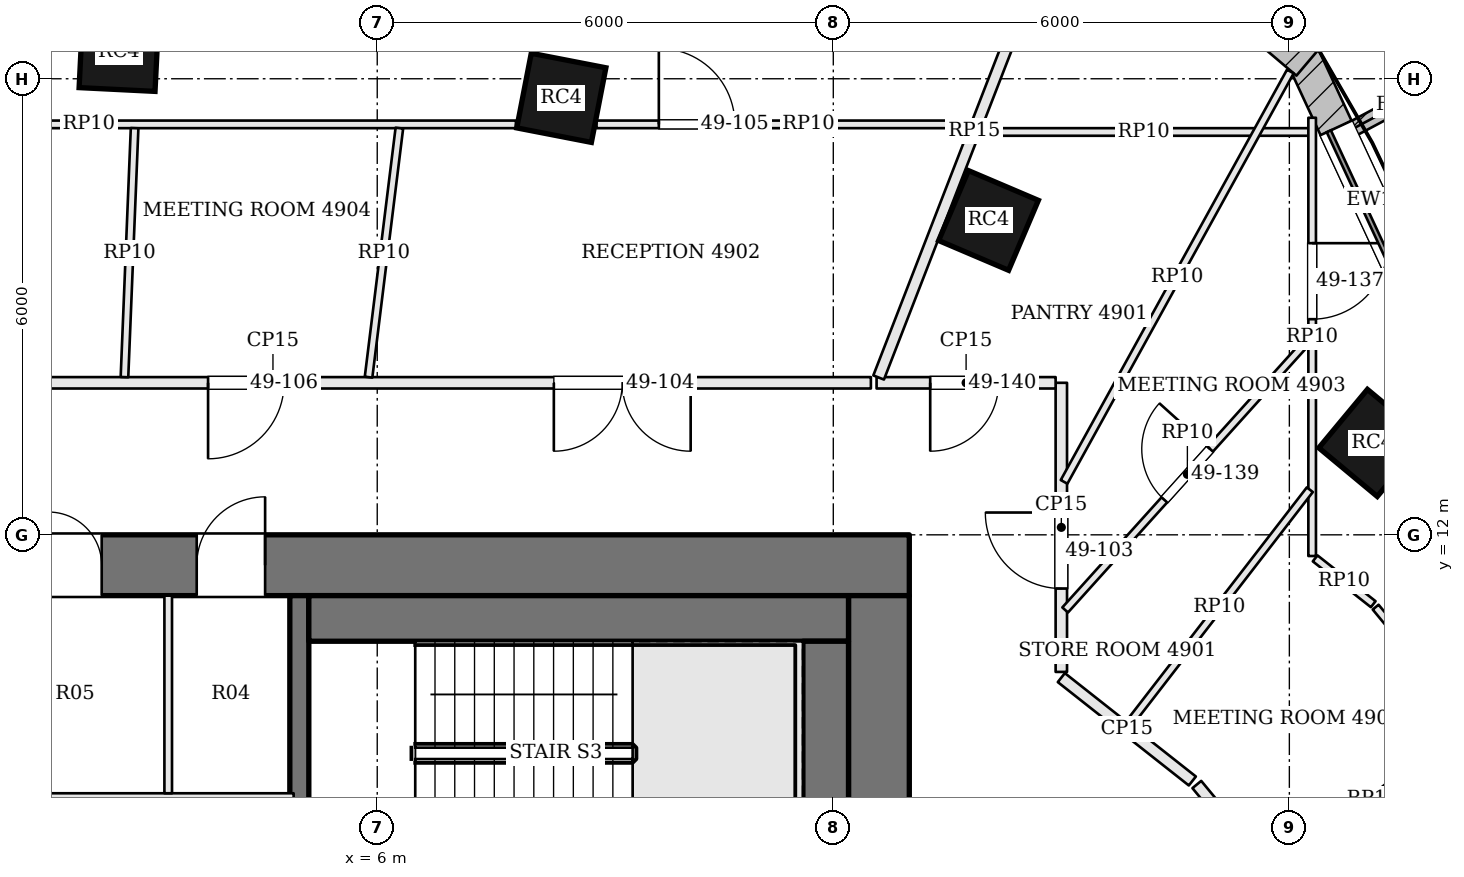
"""IFC4 building model, lengths in metres.
Left out: names, types, materials, properties, quantities, classifications, styles, units other than length and angle.
Written with IfcOpenShell. Run it as: python <this file> out.ifc"""

import sys

from ifc_helpers import new_model, si_unit, direction, frame, frame_2d, origin, origin_2d, place, context, subcontext, project, spatial, rectangle, extrude, element, fill, save


model = new_model("IFC4")
c1 = context("Model", 3, precision=1e-05, world=origin(), true_north=direction((0.0, 1.0)))
c2 = subcontext(c1, "Body", "Model", "MODEL_VIEW")
j1 = project(units=[si_unit("LENGTHUNIT", "METRE"), si_unit("PLANEANGLEUNIT", "RADIAN")], contexts=[c1])
p1 = place(None, origin())
s1 = spatial("IfcSite", under=j1, at=p1, CompositionType="ELEMENT")
p2 = place(p1, origin())
s2 = spatial("IfcBuilding", under=s1, at=p2, CompositionType="ELEMENT")
p3 = place(p2, frame((0.0, 0.0, 201.3)))
s3 = spatial("IfcBuildingStorey", under=s2, at=p3, CompositionType="ELEMENT", Elevation=201.3)
p4 = place(p3, frame((-13.0, 11.6, 0.0), z_axis=(0.0, 0.0, 1.0), x_axis=(1.0, 0.0, 0.0)))
e1 = element("IfcWall", 1, at=p4, inside=s3, PredefinedType="SHEAR", context=c2, shape_type="SweptSolid", body=[
    extrude(rectangle(XDim=26.0, YDim=0.8, at=frame_2d((13.0, 0.0))), origin(), (0.0, 0.0, 1.0), 3.9),
])
p5 = place(p4, frame((9.375, 0.0, 0.0)))
e2 = element("IfcOpeningElement", 2, at=p5, cuts=e1, PredefinedType="OPENING", context=c2, shape_type="SweptSolid", body=[
    extrude(rectangle(XDim=0.7, YDim=2.1, at=frame_2d((0.35, 1.05))), frame((0.0, 0.41, 0.0), z_axis=(0.0, -1.0, 0.0), x_axis=(1.0, 0.0, 0.0)), (0.0, 0.0, 1.0), 0.82),
])
p6 = place(p4, frame((12.075, 0.0, 0.0)))
e3 = element("IfcOpeningElement", 3, at=p6, cuts=e1, PredefinedType="OPENING", context=c2, shape_type="SweptSolid", body=[
    extrude(rectangle(XDim=1.0, YDim=2.1, at=frame_2d((0.5, 1.05))), frame((0.0, 0.41, 0.0), z_axis=(0.0, -1.0, 0.0), x_axis=(1.0, 0.0, 0.0)), (0.0, 0.0, 1.0), 0.82),
])
p7 = place(p4, frame((14.675, 0.0, 0.0)))
e4 = element("IfcOpeningElement", 4, at=p7, cuts=e1, PredefinedType="OPENING", context=c2, shape_type="SweptSolid", body=[
    extrude(rectangle(XDim=0.7, YDim=2.1, at=frame_2d((0.35, 1.05))), frame((0.0, 0.41, 0.0), z_axis=(0.0, -1.0, 0.0), x_axis=(1.0, 0.0, 0.0)), (0.0, 0.0, 1.0), 0.82),
])
p8 = place(p4, frame((16.625, 0.0, 0.0)))
e5 = element("IfcOpeningElement", 5, at=p8, cuts=e1, PredefinedType="OPENING", context=c2, shape_type="SweptSolid", body=[
    extrude(rectangle(XDim=0.9, YDim=2.1, at=frame_2d((0.45, 1.05))), frame((0.0, 0.41, 0.0), z_axis=(0.0, -1.0, 0.0), x_axis=(1.0, 0.0, 0.0)), (0.0, 0.0, 1.0), 0.82),
])
p9 = place(p3, frame((12.6, -2.2, 0.0), z_axis=(0.0, 0.0, 1.0), x_axis=(0.0, 1.0, 0.0)))
e6 = element("IfcWall", 6, at=p9, inside=s3, PredefinedType="SHEAR", context=c2, shape_type="SweptSolid", body=[
    extrude(rectangle(XDim=13.4, YDim=0.8, at=frame_2d((6.7, 0.0))), origin(), (0.0, 0.0, 1.0), 3.9),
])
p10 = place(p9, frame((7.4, 0.0, 0.0)))
e7 = element("IfcOpeningElement", 7, at=p10, cuts=e6, PredefinedType="OPENING", context=c2, shape_type="SweptSolid", body=[
    extrude(rectangle(XDim=1.8, YDim=2.1, at=frame_2d((0.9, 1.05))), frame((0.0, 0.41, 0.0), z_axis=(0.0, -1.0, 0.0), x_axis=(1.0, 0.0, 0.0)), (0.0, 0.0, 1.0), 0.82),
])
for number, where, z_axis, x_axis in (
    (8, (19.092, 13.209, 0.0), (0.0, 0.0, 1.0), (-0.769, 0.639, 0.0)),
    (9, (14.042, 16.136, 0.0), (0.0, 0.0, 1.0), (-0.92, 0.392, 0.0)),
    (10, (8.422, 17.749, 0.0), (0.0, 0.0, 1.0), (-0.982, 0.191, 0.0)),
    (11, (2.602, 18.358, 0.0), (0.0, 0.0, 1.0), (-0.999, 0.05, 0.0)),
):
    element("IfcColumn", number, at=place(p3, frame(where, z_axis=z_axis, x_axis=x_axis)), inside=s3, PredefinedType="COLUMN", context=c2, shape_type="SweptSolid", body=[
        extrude(rectangle(XDim=1.0, YDim=1.0, at=origin_2d()), origin(), (0.0, 0.0, 1.0), 3.9),
    ])
p11 = place(p3, frame((19.931, 14.519, 0.0), z_axis=(0.0, 0.0, 1.0), x_axis=(-0.421138964136, 0.906996126169, 0.0)))
e12 = element("IfcWall", 12, at=p11, inside=s3, PredefinedType="SOLIDWALL", context=c2, shape_type="SweptSolid", body=[
    extrude(rectangle(XDim=4.15, YDim=0.45, at=frame_2d((2.075, 0.0))), origin(), (0.0, 0.0, 1.0), 3.7),
])
p12 = place(p11, frame((1.025, 0.0, 0.9)))
e13 = element("IfcOpeningElement", 13, at=p12, cuts=e12, PredefinedType="OPENING", context=c2, shape_type="SweptSolid", body=[
    extrude(rectangle(XDim=2.1, YDim=2.3, at=frame_2d((1.05, 1.15))), frame((0.0, 0.235, 0.0), z_axis=(0.0, -1.0, 0.0), x_axis=(1.0, 0.0, 0.0)), (0.0, 0.0, 1.0), 0.47),
])
p13 = place(p3, frame((18.238, 18.212, 0.0), z_axis=(0.0, 0.0, 1.0), x_axis=(-0.762479604733, 0.647012250554, 0.0)))
e14 = element("IfcWall", 14, at=p13, inside=s3, PredefinedType="SOLIDWALL", context=c2, shape_type="SweptSolid", body=[
    extrude(rectangle(XDim=4.079, YDim=0.45, at=frame_2d((2.039, 0.0))), origin(), (0.0, 0.0, 1.0), 3.7),
])
p14 = place(p13, frame((0.99, 0.0, 0.9)))
e15 = element("IfcOpeningElement", 15, at=p14, cuts=e14, PredefinedType="OPENING", context=c2, shape_type="SweptSolid", body=[
    extrude(rectangle(XDim=2.1, YDim=2.3, at=frame_2d((1.05, 1.15))), frame((0.0, 0.235, 0.0), z_axis=(0.0, -1.0, 0.0), x_axis=(1.0, 0.0, 0.0)), (0.0, 0.0, 1.0), 0.47),
])
p15 = place(p3, frame((18.651, 17.243, 0.0), z_axis=(0.0, 0.0, 1.0), x_axis=(0.882225472329, 0.470827161466, 0.0)))
e16 = element("IfcWall", 16, at=p15, inside=s3, PredefinedType="SOLIDWALL", context=c2, shape_type="SweptSolid", body=[
    extrude(rectangle(XDim=1.75, YDim=0.2, at=frame_2d((0.875, 0.0))), origin(), (0.0, 0.0, 1.0), 3.7),
])
p16 = place(p3, frame((4.975, 11.2, 0.0), z_axis=(0.0, 0.0, 1.0), x_axis=(0.0, -1.0, 0.0)))
e17 = element("IfcWall", 17, at=p16, inside=s3, PredefinedType="SOLIDWALL", context=c2, shape_type="SweptSolid", body=[
    extrude(rectangle(XDim=13.4, YDim=0.25, at=frame_2d((6.7, 0.0))), origin(), (0.0, 0.0, 1.0), 3.7),
])
p17 = place(p16, frame((5.25, 0.0, 0.0)))
e18 = element("IfcOpeningElement", 18, at=p17, cuts=e17, PredefinedType="OPENING", context=c2, shape_type="SweptSolid", body=[
    extrude(rectangle(XDim=1.2, YDim=2.1, at=frame_2d((0.6, 1.05))), frame((0.0, 0.135, 0.0), z_axis=(0.0, -1.0, 0.0), x_axis=(1.0, 0.0, 0.0)), (0.0, 0.0, 1.0), 0.27),
])
p18 = place(p3, frame((12.2, 10.9, 0.0), z_axis=(0.0, 0.0, 1.0), x_axis=(-1.0, 0.0, 0.0)))
e19 = element("IfcWall", 19, at=p18, inside=s3, PredefinedType="SOLIDWALL", context=c2, shape_type="SweptSolid", body=[
    extrude(rectangle(XDim=7.1, YDim=0.6, at=frame_2d((3.55, 0.0))), origin(), (0.0, 0.0, 1.0), 3.7),
])
p19 = place(p3, frame((11.9, 10.6, 0.0), z_axis=(0.0, 0.0, 1.0), x_axis=(0.0, -1.0, 0.0)))
e20 = element("IfcWall", 20, at=p19, inside=s3, PredefinedType="SOLIDWALL", context=c2, shape_type="SweptSolid", body=[
    extrude(rectangle(XDim=2.95, YDim=0.6, at=frame_2d((1.475, 0.0))), origin(), (0.0, 0.0, 1.0), 3.7),
])
p20 = place(p3, frame((-4.9, 8.5, 0.0), z_axis=(0.0, 0.0, 1.0), x_axis=(1.0, 0.0, 0.0)))
e21 = element("IfcWall", 21, at=p20, inside=s3, PredefinedType="SOLIDWALL", context=c2, shape_type="SweptSolid", body=[
    extrude(rectangle(XDim=9.8, YDim=0.2, at=frame_2d((4.9, 0.0))), origin(), (0.0, 0.0, 1.0), 3.7),
])
p21 = place(p3, frame((3.25, 8.6, 0.0), z_axis=(0.0, 0.0, 1.0), x_axis=(0.0, 1.0, 0.0)))
e22 = element("IfcWall", 22, at=p21, inside=s3, PredefinedType="PARTITIONING", context=c2, shape_type="SweptSolid", body=[
    extrude(rectangle(XDim=2.6, YDim=0.1, at=frame_2d((1.3, 0.0))), origin(), (0.0, 0.0, 1.0), 3.7),
])
p22 = place(p3, frame((18.273, 6.909, 0.0), z_axis=(0.0, 0.0, 1.0), x_axis=(-0.63653648943, 0.771246586783, 0.0)))
e23 = element("IfcWall", 23, at=p22, inside=s3, PredefinedType="PARTITIONING", context=c2, shape_type="SweptSolid", body=[
    extrude(rectangle(XDim=2.342, YDim=0.15, at=frame_2d((1.171, 0.0))), origin(), (0.0, 0.0, 1.0), 3.084),
])
p23 = place(p22, frame((1.041, 0.0, 0.0)))
e24 = element("IfcOpeningElement", 24, at=p23, cuts=e23, PredefinedType="OPENING", context=c2, shape_type="SweptSolid", body=[
    extrude(rectangle(XDim=1.0, YDim=2.4, at=frame_2d((0.5, 1.2))), frame((0.0, 0.085, 0.0), z_axis=(0.0, -1.0, 0.0), x_axis=(1.0, 0.0, 0.0)), (0.0, 0.0, 1.0), 0.17),
])
p24 = place(p3, frame((16.724, 8.761, 0.0), z_axis=(0.0, 0.0, 1.0), x_axis=(-0.785124633057, 0.619337800047, 0.0)))
e25 = element("IfcWall", 25, at=p24, inside=s3, PredefinedType="PARTITIONING", context=c2, shape_type="SweptSolid", body=[
    extrude(rectangle(XDim=2.196, YDim=0.15, at=frame_2d((1.098, 0.0))), origin(), (0.0, 0.0, 1.0), 3.084),
])
p25 = place(p3, frame((15.0, 10.196, 0.0), z_axis=(0.0, 0.0, 1.0), x_axis=(0.0, 1.0, 0.0)))
e26 = element("IfcWall", 26, at=p25, inside=s3, PredefinedType="PARTITIONING", context=c2, shape_type="SweptSolid", body=[
    extrude(rectangle(XDim=3.804, YDim=0.15, at=frame_2d((1.902, 0.0))), origin(), (0.0, 0.0, 1.0), 3.084),
])
p26 = place(p25, frame((1.097, 0.0, 0.0)))
e27 = element("IfcOpeningElement", 27, at=p26, cuts=e26, PredefinedType="OPENING", context=c2, shape_type="SweptSolid", body=[
    extrude(rectangle(XDim=1.0, YDim=2.4, at=frame_2d((0.5, 1.2))), frame((0.0, 0.085, 0.0), z_axis=(0.0, -1.0, 0.0), x_axis=(1.0, 0.0, 0.0)), (0.0, 0.0, 1.0), 0.17),
])
p27 = place(p3, frame((14.925, 14.0, 0.0), z_axis=(0.0, 0.0, 1.0), x_axis=(-1.0, 0.0, 0.0)))
e28 = element("IfcWall", 28, at=p27, inside=s3, PredefinedType="PARTITIONING", context=c2, shape_type="SweptSolid", body=[
    extrude(rectangle(XDim=2.355, YDim=0.15, at=frame_2d((1.178, 0.0))), origin(), (0.0, 0.0, 1.0), 3.084),
])
p28 = place(p27, frame((0.75, 0.0, 0.0)))
e29 = element("IfcOpeningElement", 29, at=p28, cuts=e28, PredefinedType="OPENING", context=c2, shape_type="SweptSolid", body=[
    extrude(rectangle(XDim=0.9, YDim=2.1, at=frame_2d((0.45, 1.05))), frame((0.0, 0.085, 0.0), z_axis=(0.0, -1.0, 0.0), x_axis=(1.0, 0.0, 0.0)), (0.0, 0.0, 1.0), 0.17),
])
p29 = place(p3, frame((15.115, 20.562, 0.0), z_axis=(0.0, 0.0, 1.0), x_axis=(-0.361705111114, -0.932292557406, 0.0)))
e30 = element("IfcWall", 30, at=p29, inside=s3, PredefinedType="PARTITIONING", context=c2, shape_type="SweptSolid", body=[
    extrude(rectangle(XDim=6.964, YDim=0.15, at=frame_2d((3.482, 0.0))), origin(), (0.0, 0.0, 1.0), 3.084),
])
p30 = place(p3, frame((12.494, 14.0, 0.0), z_axis=(0.0, 0.0, 1.0), x_axis=(-1.0, 0.0, 0.0)))
e31 = element("IfcWall", 31, at=p30, inside=s3, PredefinedType="PARTITIONING", context=c2, shape_type="SweptSolid", body=[
    extrude(rectangle(XDim=15.733, YDim=0.15, at=frame_2d((7.866, 0.0))), origin(), (0.0, 0.0, 1.0), 3.084),
])
p31 = place(p30, frame((2.371, 0.0, 0.0)))
e32 = element("IfcOpeningElement", 32, at=p31, cuts=e31, PredefinedType="OPENING", context=c2, shape_type="SweptSolid", body=[
    extrude(rectangle(XDim=1.8, YDim=2.1, at=frame_2d((0.9, 1.05))), frame((0.0, 0.085, 0.0), z_axis=(0.0, -1.0, 0.0), x_axis=(1.0, 0.0, 0.0)), (0.0, 0.0, 1.0), 0.17),
])
p32 = place(p30, frame((7.72, 0.0, 0.0)))
e33 = element("IfcOpeningElement", 33, at=p32, cuts=e31, PredefinedType="OPENING", context=c2, shape_type="SweptSolid", body=[
    extrude(rectangle(XDim=1.0, YDim=2.4, at=frame_2d((0.5, 1.2))), frame((0.0, 0.085, 0.0), z_axis=(0.0, -1.0, 0.0), x_axis=(1.0, 0.0, 0.0)), (0.0, 0.0, 1.0), 0.17),
])
p33 = place(p3, frame((13.871, 17.3, 0.0), z_axis=(0.0, 0.0, 1.0), x_axis=(1.0, 0.0, 0.0)))
e34 = element("IfcWall", 34, at=p33, inside=s3, PredefinedType="PARTITIONING", context=c2, shape_type="SweptSolid", body=[
    extrude(rectangle(XDim=4.428, YDim=0.1, at=frame_2d((2.214, 0.0))), origin(), (0.0, 0.0, 1.0), 3.084),
])
p34 = place(p3, frame((18.3, 17.487, 0.0), z_axis=(0.0, 0.0, 1.0), x_axis=(4.2344173e-05, -0.999999999103, 0.0)))
e35 = element("IfcWall", 35, at=p34, inside=s3, PredefinedType="PARTITIONING", context=c2, shape_type="SweptSolid", body=[
    extrude(rectangle(XDim=5.766, YDim=0.1, at=frame_2d((2.883, 0.0))), origin(), (0.0, 0.0, 1.0), 3.084),
])
p35 = place(p34, frame((1.65, 0.0, 0.0)))
e36 = element("IfcOpeningElement", 36, at=p35, cuts=e35, PredefinedType="OPENING", context=c2, shape_type="SweptSolid", body=[
    extrude(rectangle(XDim=1.0, YDim=2.4, at=frame_2d((0.5, 1.2))), frame((0.0, 0.06, 0.0), z_axis=(0.0, -1.0, 0.0), x_axis=(1.0, 0.0, 0.0)), (0.0, 0.0, 1.0), 0.12),
])
p36 = place(p3, frame((18.339, 11.69, 0.0), z_axis=(0.0, 0.0, 1.0), x_axis=(0.785133114635, -0.619327047934, 0.0)))
e37 = element("IfcWall", 37, at=p36, inside=s3, PredefinedType="PARTITIONING", context=c2, shape_type="SweptSolid", body=[
    extrude(rectangle(XDim=0.973, YDim=0.1, at=frame_2d((0.487, 0.0))), origin(), (0.0, 0.0, 1.0), 3.084),
])
p37 = place(p3, frame((19.135, 11.049, 0.0), z_axis=(0.0, 0.0, 1.0), x_axis=(0.636562826748, -0.771224848927, 0.0)))
e38 = element("IfcWall", 38, at=p37, inside=s3, PredefinedType="PARTITIONING", context=c2, shape_type="SweptSolid", body=[
    extrude(rectangle(XDim=3.129, YDim=0.1, at=frame_2d((1.564, 0.0))), origin(), (0.0, 0.0, 1.0), 3.084),
])
p38 = place(p3, frame((17.85, 7.54, 0.0), z_axis=(0.0, 0.0, 1.0), x_axis=(0.784835535168, 0.619704109021, 0.0)))
e39 = element("IfcWall", 39, at=p38, inside=s3, PredefinedType="PARTITIONING", context=c2, shape_type="SweptSolid", body=[
    extrude(rectangle(XDim=3.176, YDim=0.1, at=frame_2d((1.588, 0.0))), origin(), (0.0, 0.0, 1.0), 3.084),
])
p39 = place(p3, frame((15.89, 9.515, 0.0), z_axis=(0.0, 0.0, 1.0), x_axis=(0.611483217527, 0.791257401028, 0.0)))
e40 = element("IfcWall", 40, at=p39, inside=s3, PredefinedType="PARTITIONING", context=c2, shape_type="SweptSolid", body=[
    extrude(rectangle(XDim=3.891, YDim=0.1, at=frame_2d((1.945, 0.0))), origin(), (0.0, 0.0, 1.0), 3.084),
])
p40 = place(p3, frame((15.05, 11.011, 0.0), z_axis=(0.0, 0.0, 1.0), x_axis=(0.669413787396, 0.742889750397, 0.0)))
e41 = element("IfcWall", 41, at=p40, inside=s3, PredefinedType="PARTITIONING", context=c2, shape_type="SweptSolid", body=[
    extrude(rectangle(XDim=4.805, YDim=0.1, at=frame_2d((2.402, 0.0))), origin(), (0.0, 0.0, 1.0), 3.084),
])
p41 = place(p40, frame((1.95, 0.0, 0.0)))
e42 = element("IfcOpeningElement", 42, at=p41, cuts=e41, PredefinedType="OPENING", context=c2, shape_type="SweptSolid", body=[
    extrude(rectangle(XDim=0.9, YDim=2.1, at=frame_2d((0.45, 1.05))), frame((0.0, 0.06, 0.0), z_axis=(0.0, -1.0, 0.0), x_axis=(1.0, 0.0, 0.0)), (0.0, 0.0, 1.0), 0.12),
])
p42 = place(p3, frame((15.036, 12.697, 0.0), z_axis=(0.0, 0.0, 1.0), x_axis=(0.482822947205, 0.87571799208, 0.0)))
e43 = element("IfcWall", 43, at=p42, inside=s3, PredefinedType="PARTITIONING", context=c2, shape_type="SweptSolid", body=[
    extrude(rectangle(XDim=6.166, YDim=0.1, at=frame_2d((3.083, 0.0))), origin(), (0.0, 0.0, 1.0), 3.084),
])
p43 = place(p3, frame((-3.41, 17.4, 0.0), z_axis=(0.0, 0.0, 1.0), x_axis=(1.0, 0.0, 0.0)))
e44 = element("IfcWall", 44, at=p43, inside=s3, PredefinedType="PARTITIONING", context=c2, shape_type="SweptSolid", body=[
    extrude(rectangle(XDim=11.235, YDim=0.1, at=frame_2d((5.617, 0.0))), origin(), (0.0, 0.0, 1.0), 3.084),
])
p44 = place(p43, frame((2.752, 0.0, 0.0)))
e45 = element("IfcOpeningElement", 45, at=p44, cuts=e44, PredefinedType="OPENING", context=c2, shape_type="SweptSolid", body=[
    extrude(rectangle(XDim=0.9, YDim=2.1, at=frame_2d((0.45, 1.05))), frame((0.0, 0.06, 0.0), z_axis=(0.0, -1.0, 0.0), x_axis=(1.0, 0.0, 0.0)), (0.0, 0.0, 1.0), 0.12),
])
p45 = place(p3, frame((8.884, 17.4, 0.0), z_axis=(0.0, 0.0, 1.0), x_axis=(1.0, 0.0, 0.0)))
e46 = element("IfcWall", 46, at=p45, inside=s3, PredefinedType="PARTITIONING", context=c2, shape_type="SweptSolid", body=[
    extrude(rectangle(XDim=4.983, YDim=0.1, at=frame_2d((2.492, 0.0))), origin(), (0.0, 0.0, 1.0), 3.084),
])
p46 = place(p45, frame((0.821, 0.0, 0.0)))
e47 = element("IfcOpeningElement", 47, at=p46, cuts=e46, PredefinedType="OPENING", context=c2, shape_type="SweptSolid", body=[
    extrude(rectangle(XDim=1.0, YDim=2.1, at=frame_2d((0.5, 1.05))), frame((0.0, 0.06, 0.0), z_axis=(0.0, -1.0, 0.0), x_axis=(1.0, 0.0, 0.0)), (0.0, 0.0, 1.0), 0.12),
])
p47 = place(p3, frame((5.886, 14.074, 0.0), z_axis=(0.0, 0.0, 1.0), x_axis=(0.122778403884, 0.992434110427, 0.0)))
e48 = element("IfcWall", 48, at=p47, inside=s3, PredefinedType="PARTITIONING", context=c2, shape_type="SweptSolid", body=[
    extrude(rectangle(XDim=3.301, YDim=0.1, at=frame_2d((1.65, 0.0))), origin(), (0.0, 0.0, 1.0), 3.084),
])
p48 = place(p3, frame((2.675, 14.075, 0.0), z_axis=(0.0, 0.0, 1.0), x_axis=(0.040667038657, 0.999172753815, 0.0)))
e49 = element("IfcWall", 49, at=p48, inside=s3, PredefinedType="PARTITIONING", context=c2, shape_type="SweptSolid", body=[
    extrude(rectangle(XDim=3.278, YDim=0.1, at=frame_2d((1.639, 0.0))), origin(), (0.0, 0.0, 1.0), 3.084),
])
p49 = place(p12, origin())
e50 = element("IfcWindow", 50, at=p49, inside=s3, PartitioningType="SINGLE_PANEL", PredefinedType="WINDOW", context=c2, shape_type="SweptSolid", body=[
    extrude(rectangle(XDim=2.1, YDim=2.3, at=frame_2d((1.05, 1.15))), frame((0.0, 0.135, 0.0), z_axis=(0.0, -1.0, 0.0), x_axis=(1.0, 0.0, 0.0)), (0.0, 0.0, 1.0), 0.06),
])
fill(e13, e50)
p50 = place(p7, origin())
e51 = element("IfcDoor", 51, at=p50, inside=s3, OperationType="SINGLE_SWING_LEFT", PredefinedType="DOOR", context=c2, shape_type="SweptSolid", body=[
    extrude(rectangle(XDim=0.7, YDim=2.1, at=frame_2d((0.35, 1.05))), frame((0.0, 0.025, 0.0), z_axis=(0.0, -1.0, 0.0), x_axis=(1.0, 0.0, 0.0)), (0.0, 0.0, 1.0), 0.05),
])
fill(e4, e51)
p51 = place(p8, origin())
e52 = element("IfcDoor", 52, at=p51, inside=s3, OperationType="SINGLE_SWING_RIGHT", PredefinedType="DOOR", context=c2, shape_type="SweptSolid", body=[
    extrude(rectangle(XDim=0.9, YDim=2.1, at=frame_2d((0.45, 1.05))), frame((0.0, 0.025, 0.0), z_axis=(0.0, -1.0, 0.0), x_axis=(1.0, 0.0, 0.0)), (0.0, 0.0, 1.0), 0.05),
])
fill(e5, e52)
p52 = place(p26, origin())
e53 = element("IfcDoor", 53, at=p52, inside=s3, OperationType="SINGLE_SWING_RIGHT", PredefinedType="DOOR", context=c2, shape_type="SweptSolid", body=[
    extrude(rectangle(XDim=1.0, YDim=2.4, at=frame_2d((0.5, 1.2))), frame((0.0, 0.025, 0.0), z_axis=(0.0, -1.0, 0.0), x_axis=(1.0, 0.0, 0.0)), (0.0, 0.0, 1.0), 0.05),
])
fill(e27, e53)
p53 = place(p31, origin())
e54 = element("IfcDoor", 54, at=p53, inside=s3, OperationType="DOUBLE_DOOR_SINGLE_SWING", PredefinedType="DOOR", context=c2, shape_type="SweptSolid", body=[
    extrude(rectangle(XDim=1.8, YDim=2.1, at=frame_2d((0.9, 1.05))), frame((0.0, 0.025, 0.0), z_axis=(0.0, -1.0, 0.0), x_axis=(1.0, 0.0, 0.0)), (0.0, 0.0, 1.0), 0.05),
])
fill(e32, e54)
p54 = place(p46, origin())
e55 = element("IfcDoor", 55, at=p54, inside=s3, OperationType="SINGLE_SWING_LEFT", PredefinedType="DOOR", context=c2, shape_type="SweptSolid", body=[
    extrude(rectangle(XDim=1.0, YDim=2.1, at=frame_2d((0.5, 1.05))), frame((0.0, 0.025, 0.0), z_axis=(0.0, -1.0, 0.0), x_axis=(1.0, 0.0, 0.0)), (0.0, 0.0, 1.0), 0.05),
])
fill(e47, e55)
p55 = place(p32, origin())
e56 = element("IfcDoor", 56, at=p55, inside=s3, OperationType="SINGLE_SWING_RIGHT", PredefinedType="DOOR", context=c2, shape_type="SweptSolid", body=[
    extrude(rectangle(XDim=1.0, YDim=2.4, at=frame_2d((0.5, 1.2))), frame((0.0, 0.025, 0.0), z_axis=(0.0, -1.0, 0.0), x_axis=(1.0, 0.0, 0.0)), (0.0, 0.0, 1.0), 0.05),
])
fill(e33, e56)
p56 = place(p35, origin())
e57 = element("IfcDoor", 57, at=p56, inside=s3, OperationType="SINGLE_SWING_LEFT", PredefinedType="DOOR", context=c2, shape_type="SweptSolid", body=[
    extrude(rectangle(XDim=1.0, YDim=2.4, at=frame_2d((0.5, 1.2))), frame((0.0, 0.025, 0.0), z_axis=(0.0, -1.0, 0.0), x_axis=(1.0, 0.0, 0.0)), (0.0, 0.0, 1.0), 0.05),
])
fill(e36, e57)
p57 = place(p41, origin())
e58 = element("IfcDoor", 58, at=p57, inside=s3, OperationType="SINGLE_SWING_RIGHT", PredefinedType="DOOR", context=c2, shape_type="SweptSolid", body=[
    extrude(rectangle(XDim=0.9, YDim=2.1, at=frame_2d((0.45, 1.05))), frame((0.0, 0.025, 0.0), z_axis=(0.0, -1.0, 0.0), x_axis=(1.0, 0.0, 0.0)), (0.0, 0.0, 1.0), 0.05),
])
fill(e42, e58)
p58 = place(p28, origin())
e59 = element("IfcDoor", 59, at=p58, inside=s3, OperationType="SINGLE_SWING_RIGHT", PredefinedType="DOOR", context=c2, shape_type="SweptSolid", body=[
    extrude(rectangle(XDim=0.9, YDim=2.1, at=frame_2d((0.45, 1.05))), frame((0.0, 0.025, 0.0), z_axis=(0.0, -1.0, 0.0), x_axis=(1.0, 0.0, 0.0)), (0.0, 0.0, 1.0), 0.05),
])
fill(e29, e59)
save(model, sys.argv[1])
